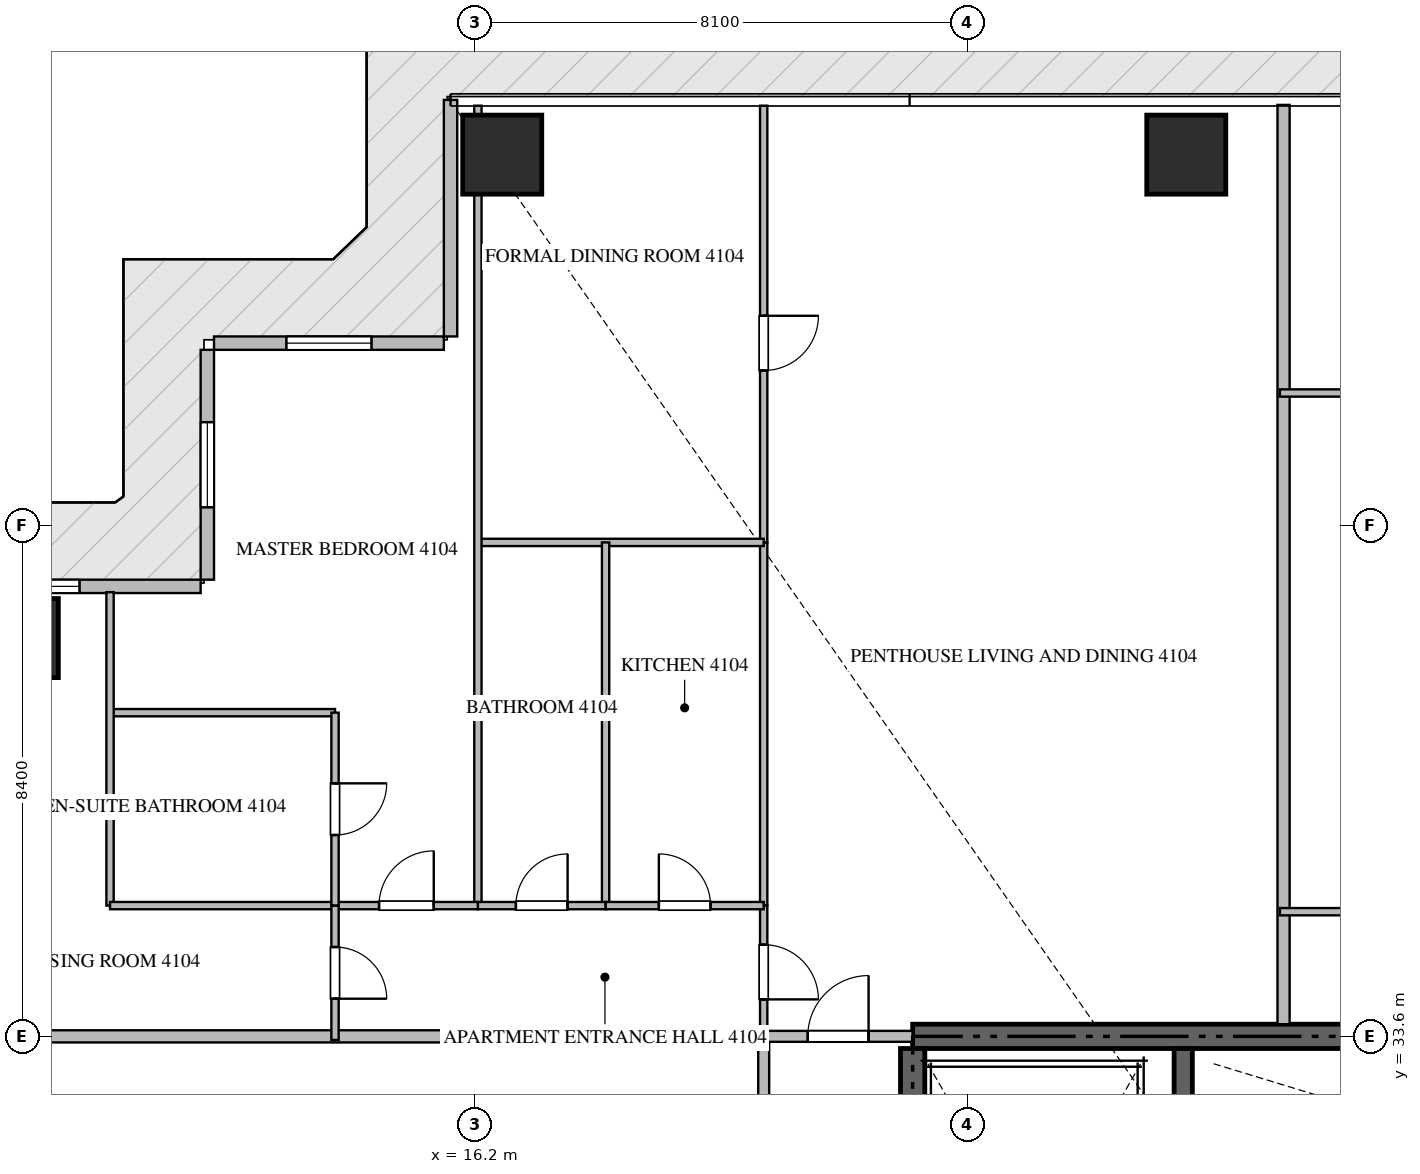
"""IFC4 building model, lengths in metres.
Left out: names, types, materials, properties, quantities, classifications, styles, units other than length and angle.
Written with IfcOpenShell. Run it as: python <this file> out.ifc"""

import sys

from ifc_helpers import new_model, si_unit, direction, frame, frame_2d, origin, origin_2d, place, context, subcontext, project, spatial, rectangle, extrude, source, transform, mapped, element, fill, save


model = new_model("IFC4")
c1 = context("Model", 3, precision=1e-05, world=origin(), true_north=direction((0.0, 1.0)))
c2 = subcontext(c1, "Body", "Model", "MODEL_VIEW")
j1 = project(units=[si_unit("LENGTHUNIT", "METRE"), si_unit("PLANEANGLEUNIT", "RADIAN")], contexts=[c1])
p1 = place(None, origin())
s1 = spatial("IfcSite", under=j1, at=p1, CompositionType="ELEMENT")
p2 = place(p1, origin())
s2 = spatial("IfcBuilding", under=s1, at=p2, CompositionType="ELEMENT")
p3 = place(p2, frame((0.0, 0.0, 165.15)))
s3 = spatial("IfcBuildingStorey", under=s2, at=p3, CompositionType="ELEMENT", Elevation=165.15)
p4 = place(p3, frame((41.4, 33.6, -0.26), z_axis=(0.0, 0.0, 1.0), x_axis=(-1.0, 0.0, 0.0)))
e1 = element("IfcWall", 1, at=p4, inside=s3, PredefinedType="SHEAR", context=c2, shape_type="SweptSolid", body=[
    extrude(rectangle(XDim=18.0, YDim=0.4, at=frame_2d((9.0, 0.0))), origin(), (0.0, 0.0, 1.0), 3.748),
])
p5 = place(p3, frame((23.4, 24.25, -0.26), z_axis=(0.0, 0.0, 1.0), x_axis=(0.0, 1.0, 0.0)))
e2 = element("IfcWall", 2, at=p5, inside=s3, PredefinedType="SHEAR", context=c2, shape_type="SweptSolid", body=[
    extrude(rectangle(XDim=9.15, YDim=0.4, at=frame_2d((4.575, 0.0))), origin(), (0.0, 0.0, 1.0), 3.748),
])
p6 = place(p3, frame((27.85, 23.55, -0.26), z_axis=(0.0, 0.0, 1.0), x_axis=(0.0, 1.0, 0.0)))
e3 = element("IfcWall", 3, at=p6, inside=s3, PredefinedType="SHEAR", context=c2, shape_type="SweptSolid", body=[
    extrude(rectangle(XDim=9.85, YDim=0.3, at=frame_2d((4.925, 0.0))), origin(), (0.0, 0.0, 1.0), 3.748),
])
m1 = source(origin(), c2, "Body", "SweptSolid", [
    extrude(rectangle(XDim=1.3, YDim=1.3, at=origin_2d()), origin(), (0.0, 0.0, 1.0), 3.75),
])
for number, where, z_axis, x_axis in (
    (4, (16.65, 48.1, -0.26), (0.0, 0.0, 1.0), (1.0, 0.0, 0.0)),
    (5, (27.9, 48.1, -0.26), (0.0, 0.0, 1.0), (1.0, 0.0, 0.0)),
    (6, (8.7, 40.15, -0.26), (0.0, 0.0, 1.0), (1.0, 0.0, 0.0)),
):
    element("IfcColumn", number, at=place(p3, frame(where, z_axis=z_axis, x_axis=x_axis)), inside=s3, PredefinedType="COLUMN", context=c2, shape_type="MappedRepresentation", body=[
        mapped(m1, transform((0.0, 0.0, 0.0), scale=1.0)),
    ])
p7 = place(p3, frame((15.8, 49.0, 0.0), z_axis=(0.0, 0.0, 1.0), x_axis=(0.0, -1.0, 0.0)))
e7 = element("IfcWall", 7, at=p7, inside=s3, PredefinedType="ELEMENTEDWALL", context=c2, shape_type="SweptSolid", body=[
    extrude(rectangle(XDim=3.89, YDim=0.22, at=frame_2d((1.945, 0.0))), origin(), (0.0, 0.0, 1.0), 3.475),
])
p8 = place(p3, frame((15.69, 45.0, 0.0), z_axis=(0.0, 0.0, 1.0), x_axis=(-1.0, 0.0, 0.0)))
e8 = element("IfcWall", 8, at=p8, inside=s3, PredefinedType="ELEMENTEDWALL", context=c2, shape_type="SweptSolid", body=[
    extrude(rectangle(XDim=3.78, YDim=0.22, at=frame_2d((1.89, 0.0))), origin(), (0.0, 0.0, 1.0), 3.475),
])
p9 = place(p8, frame((1.19, 0.0, 0.65)))
e9 = element("IfcOpeningElement", 9, at=p9, cuts=e8, PredefinedType="OPENING", context=c2, shape_type="SweptSolid", body=[
    extrude(rectangle(XDim=1.4, YDim=2.05, at=frame_2d((0.7, 1.025))), frame((0.0, 0.12, 0.0), z_axis=(0.0, -1.0, 0.0), x_axis=(1.0, 0.0, 0.0)), (0.0, 0.0, 1.0), 0.24),
])
p10 = place(p3, frame((11.8, 44.89, 0.0), z_axis=(0.0, 0.0, 1.0), x_axis=(0.0, -1.0, 0.0)))
e10 = element("IfcWall", 10, at=p10, inside=s3, PredefinedType="ELEMENTEDWALL", context=c2, shape_type="SweptSolid", body=[
    extrude(rectangle(XDim=3.78, YDim=0.22, at=frame_2d((1.89, 0.0))), origin(), (0.0, 0.0, 1.0), 3.475),
])
p11 = place(p10, frame((1.19, 0.0, 0.65)))
e11 = element("IfcOpeningElement", 11, at=p11, cuts=e10, PredefinedType="OPENING", context=c2, shape_type="SweptSolid", body=[
    extrude(rectangle(XDim=1.4, YDim=2.05, at=frame_2d((0.7, 1.025))), frame((0.0, 0.12, 0.0), z_axis=(0.0, -1.0, 0.0), x_axis=(1.0, 0.0, 0.0)), (0.0, 0.0, 1.0), 0.24),
])
p12 = place(p3, frame((11.69, 41.0, 0.0), z_axis=(0.0, 0.0, 1.0), x_axis=(-1.0, 0.0, 0.0)))
e12 = element("IfcWall", 12, at=p12, inside=s3, PredefinedType="ELEMENTEDWALL", context=c2, shape_type="SweptSolid", body=[
    extrude(rectangle(XDim=3.89, YDim=0.22, at=frame_2d((1.945, 0.0))), origin(), (0.0, 0.0, 1.0), 3.475),
])
p13 = place(p12, frame((1.992, 0.0, 0.65)))
e13 = element("IfcOpeningElement", 13, at=p13, cuts=e12, PredefinedType="OPENING", context=c2, shape_type="SweptSolid", body=[
    extrude(rectangle(XDim=1.4, YDim=2.05, at=frame_2d((0.7, 1.025))), frame((0.0, 0.12, 0.0), z_axis=(0.0, -1.0, 0.0), x_axis=(1.0, 0.0, 0.0)), (0.0, 0.0, 1.0), 0.24),
])
p14 = place(p3, frame((29.5, 33.8, 0.0), z_axis=(0.0, 0.0, 1.0), x_axis=(0.0, 1.0, 0.0)))
e14 = element("IfcWall", 14, at=p14, inside=s3, PredefinedType="PARTITIONING", context=c2, shape_type="SweptSolid", body=[
    extrude(rectangle(XDim=15.118, YDim=0.2, at=frame_2d((7.559, 0.0))), origin(), (0.0, 0.0, 1.0), 3.49),
])
p15 = place(p3, frame((7.882, 33.6, 0.0), z_axis=(0.0, 0.0, 1.0), x_axis=(1.0, 0.0, 0.0)))
e15 = element("IfcWall", 15, at=p15, inside=s3, PredefinedType="PARTITIONING", context=c2, shape_type="SweptSolid", body=[
    extrude(rectangle(XDim=13.068, YDim=0.2, at=frame_2d((6.534, 0.0))), origin(), (0.0, 0.0, 1.0), 3.49),
])
p16 = place(p3, frame((20.95, 14.9, 0.0), z_axis=(0.0, 0.0, 1.0), x_axis=(0.0, 1.0, 0.0)))
e16 = element("IfcWall", 16, at=p16, inside=s3, PredefinedType="PARTITIONING", context=c2, shape_type="SweptSolid", body=[
    extrude(rectangle(XDim=18.7, YDim=0.18, at=frame_2d((9.35, 0.0))), origin(), (0.0, 0.0, 1.0), 3.49),
])
p17 = place(p16, frame((1.805, 0.0, 0.0)))
e17 = element("IfcOpeningElement", 17, at=p17, cuts=e16, PredefinedType="OPENING", context=c2, shape_type="SweptSolid", body=[
    extrude(rectangle(XDim=1.0, YDim=2.15, at=frame_2d((0.5, 1.075))), frame((0.0, 0.1, 0.0), z_axis=(0.0, -1.0, 0.0), x_axis=(1.0, 0.0, 0.0)), (0.0, 0.0, 1.0), 0.2),
])
p18 = place(p16, frame((15.257, 0.0, 0.0)))
e18 = element("IfcOpeningElement", 18, at=p18, cuts=e16, PredefinedType="OPENING", context=c2, shape_type="SweptSolid", body=[
    extrude(rectangle(XDim=1.0, YDim=2.15, at=frame_2d((0.5, 1.075))), frame((0.0, 0.1, 0.0), z_axis=(0.0, -1.0, 0.0), x_axis=(1.0, 0.0, 0.0)), (0.0, 0.0, 1.0), 0.2),
])
p19 = place(p3, frame((20.952, 33.6, 0.0), z_axis=(0.0, 0.0, 1.0), x_axis=(1.0, 0.0, 0.0)))
e19 = element("IfcWall", 19, at=p19, inside=s3, PredefinedType="PARTITIONING", context=c2, shape_type="SweptSolid", body=[
    extrude(rectangle(XDim=2.446, YDim=0.18, at=frame_2d((1.223, 0.0))), origin(), (0.0, 0.0, 1.0), 3.49),
])
p20 = place(p19, frame((0.723, 0.0, 0.0)))
e20 = element("IfcOpeningElement", 20, at=p20, cuts=e19, PredefinedType="OPENING", context=c2, shape_type="SweptSolid", body=[
    extrude(rectangle(XDim=1.0, YDim=2.15, at=frame_2d((0.5, 1.075))), frame((0.0, 0.1, 0.0), z_axis=(0.0, -1.0, 0.0), x_axis=(1.0, 0.0, 0.0)), (0.0, 0.0, 1.0), 0.2),
])
p21 = place(p3, frame((20.95, 35.75, 0.0), z_axis=(0.0, 0.0, 1.0), x_axis=(0.0, -1.0, 0.0)))
e21 = element("IfcWall", 21, at=p21, inside=s3, PredefinedType="PARTITIONING", context=c2, shape_type="SweptSolid", body=[
    extrude(rectangle(XDim=2.148, YDim=0.12, at=frame_2d((1.074, 0.0))), origin(), (0.0, 0.0, 1.0), 3.49),
])
p22 = place(p21, frame((0.642, 0.0, 0.0)))
e22 = element("IfcOpeningElement", 22, at=p22, cuts=e21, PredefinedType="OPENING", context=c2, shape_type="SweptSolid", body=[
    extrude(rectangle(XDim=0.9, YDim=2.1, at=frame_2d((0.45, 1.05))), frame((0.0, 0.07, 0.0), z_axis=(0.0, -1.0, 0.0), x_axis=(1.0, 0.0, 0.0)), (0.0, 0.0, 1.0), 0.14),
])
p23 = place(p3, frame((20.95, 48.905, 0.0), z_axis=(0.0, 0.0, 1.0), x_axis=(0.0, -1.0, 0.0)))
e23 = element("IfcWall", 23, at=p23, inside=s3, PredefinedType="PARTITIONING", context=c2, shape_type="SweptSolid", body=[
    extrude(rectangle(XDim=7.182, YDim=0.12, at=frame_2d((3.591, 0.0))), origin(), (0.0, 0.0, 1.0), 3.49),
])
p24 = place(p23, frame((3.455, 0.0, 0.0)))
e24 = element("IfcOpeningElement", 24, at=p24, cuts=e23, PredefinedType="OPENING", context=c2, shape_type="SweptSolid", body=[
    extrude(rectangle(XDim=0.9, YDim=2.1, at=frame_2d((0.45, 1.05))), frame((0.0, 0.07, 0.0), z_axis=(0.0, -1.0, 0.0), x_axis=(1.0, 0.0, 0.0)), (0.0, 0.0, 1.0), 0.14),
])
p25 = place(p3, frame((20.95, 41.721, 0.0), z_axis=(0.0, 0.0, 1.0), x_axis=(0.0, -1.0, 0.0)))
e25 = element("IfcWall", 25, at=p25, inside=s3, PredefinedType="PARTITIONING", context=c2, shape_type="SweptSolid", body=[
    extrude(rectangle(XDim=5.969, YDim=0.12, at=frame_2d((2.984, 0.0))), origin(), (0.0, 0.0, 1.0), 3.49),
])
p26 = place(p3, frame((16.25, 41.723, 0.0), z_axis=(0.0, 0.0, 1.0), x_axis=(1.0, 0.0, 0.0)))
e26 = element("IfcWall", 26, at=p26, inside=s3, PredefinedType="PARTITIONING", context=c2, shape_type="SweptSolid", body=[
    extrude(rectangle(XDim=4.7, YDim=0.12, at=frame_2d((2.35, 0.0))), origin(), (0.0, 0.0, 1.0), 3.49),
])
p27 = place(p3, frame((16.25, 48.905, 0.0), z_axis=(0.0, 0.0, 1.0), x_axis=(0.0, -1.0, 0.0)))
e27 = element("IfcWall", 27, at=p27, inside=s3, PredefinedType="PARTITIONING", context=c2, shape_type="SweptSolid", body=[
    extrude(rectangle(XDim=13.155, YDim=0.12, at=frame_2d((6.578, 0.0))), origin(), (0.0, 0.0, 1.0), 3.49),
])
p28 = place(p3, frame((18.35, 41.723, 0.0), z_axis=(0.0, 0.0, 1.0), x_axis=(0.0, -1.0, 0.0)))
e28 = element("IfcWall", 28, at=p28, inside=s3, PredefinedType="PARTITIONING", context=c2, shape_type="SweptSolid", body=[
    extrude(rectangle(XDim=5.973, YDim=0.12, at=frame_2d((2.986, 0.0))), origin(), (0.0, 0.0, 1.0), 3.49),
])
p29 = place(p3, frame((16.25, 35.75, 0.0), z_axis=(0.0, 0.0, 1.0), x_axis=(1.0, 0.0, 0.0)))
e29 = element("IfcWall", 29, at=p29, inside=s3, PredefinedType="PARTITIONING", context=c2, shape_type="SweptSolid", body=[
    extrude(rectangle(XDim=2.1, YDim=0.12, at=frame_2d((1.05, 0.0))), origin(), (0.0, 0.0, 1.0), 3.49),
])
p30 = place(p29, frame((0.625, 0.0, 0.0)))
e30 = element("IfcOpeningElement", 30, at=p30, cuts=e29, PredefinedType="OPENING", context=c2, shape_type="SweptSolid", body=[
    extrude(rectangle(XDim=0.85, YDim=2.1, at=frame_2d((0.425, 1.05))), frame((0.0, 0.07, 0.0), z_axis=(0.0, -1.0, 0.0), x_axis=(1.0, 0.0, 0.0)), (0.0, 0.0, 1.0), 0.14),
])
p31 = place(p3, frame((18.352, 35.75, 0.0), z_axis=(0.0, 0.0, 1.0), x_axis=(1.0, 0.0, 0.0)))
e31 = element("IfcWall", 31, at=p31, inside=s3, PredefinedType="PARTITIONING", context=c2, shape_type="SweptSolid", body=[
    extrude(rectangle(XDim=2.598, YDim=0.12, at=frame_2d((1.299, 0.0))), origin(), (0.0, 0.0, 1.0), 3.49),
])
p32 = place(p31, frame((0.874, 0.0, 0.0)))
e32 = element("IfcOpeningElement", 32, at=p32, cuts=e31, PredefinedType="OPENING", context=c2, shape_type="SweptSolid", body=[
    extrude(rectangle(XDim=0.85, YDim=2.1, at=frame_2d((0.425, 1.05))), frame((0.0, 0.07, 0.0), z_axis=(0.0, -1.0, 0.0), x_axis=(1.0, 0.0, 0.0)), (0.0, 0.0, 1.0), 0.14),
])
p33 = place(p3, frame((13.9, 35.75, 0.0), z_axis=(0.0, 0.0, 1.0), x_axis=(1.0, 0.0, 0.0)))
e33 = element("IfcWall", 33, at=p33, inside=s3, PredefinedType="PARTITIONING", context=c2, shape_type="SweptSolid", body=[
    extrude(rectangle(XDim=2.348, YDim=0.12, at=frame_2d((1.174, 0.0))), origin(), (0.0, 0.0, 1.0), 3.49),
])
p34 = place(p33, frame((0.724, 0.0, 0.0)))
e34 = element("IfcOpeningElement", 34, at=p34, cuts=e33, PredefinedType="OPENING", context=c2, shape_type="SweptSolid", body=[
    extrude(rectangle(XDim=0.9, YDim=2.1, at=frame_2d((0.45, 1.05))), frame((0.0, 0.07, 0.0), z_axis=(0.0, -1.0, 0.0), x_axis=(1.0, 0.0, 0.0)), (0.0, 0.0, 1.0), 0.14),
])
p35 = place(p3, frame((10.2, 38.923, 0.0), z_axis=(0.0, 0.0, 1.0), x_axis=(1.0, 0.0, 0.0)))
e35 = element("IfcWall", 35, at=p35, inside=s3, PredefinedType="PARTITIONING", context=c2, shape_type="SweptSolid", body=[
    extrude(rectangle(XDim=3.7, YDim=0.12, at=frame_2d((1.85, 0.0))), origin(), (0.0, 0.0, 1.0), 3.49),
])
p36 = place(p3, frame((10.2, 40.905, 0.0), z_axis=(0.0, 0.0, 1.0), x_axis=(0.0, -1.0, 0.0)))
e36 = element("IfcWall", 36, at=p36, inside=s3, PredefinedType="PARTITIONING", context=c2, shape_type="SweptSolid", body=[
    extrude(rectangle(XDim=5.155, YDim=0.12, at=frame_2d((2.578, 0.0))), origin(), (0.0, 0.0, 1.0), 3.49),
])
p37 = place(p3, frame((10.2, 35.75, 0.0), z_axis=(0.0, 0.0, 1.0), x_axis=(1.0, 0.0, 0.0)))
e37 = element("IfcWall", 37, at=p37, inside=s3, PredefinedType="PARTITIONING", context=c2, shape_type="SweptSolid", body=[
    extrude(rectangle(XDim=3.698, YDim=0.12, at=frame_2d((1.849, 0.0))), origin(), (0.0, 0.0, 1.0), 3.49),
])
p38 = place(p3, frame((13.9, 38.923, 0.0), z_axis=(0.0, 0.0, 1.0), x_axis=(0.0, -1.0, 0.0)))
e38 = element("IfcWall", 38, at=p38, inside=s3, PredefinedType="PARTITIONING", context=c2, shape_type="SweptSolid", body=[
    extrude(rectangle(XDim=3.173, YDim=0.12, at=frame_2d((1.586, 0.0))), origin(), (0.0, 0.0, 1.0), 3.49),
])
p39 = place(p38, frame((1.162, 0.0, 0.0)))
e39 = element("IfcOpeningElement", 39, at=p39, cuts=e38, PredefinedType="OPENING", context=c2, shape_type="SweptSolid", body=[
    extrude(rectangle(XDim=0.85, YDim=2.1, at=frame_2d((0.425, 1.05))), frame((0.0, 0.07, 0.0), z_axis=(0.0, -1.0, 0.0), x_axis=(1.0, 0.0, 0.0)), (0.0, 0.0, 1.0), 0.14),
])
p40 = place(p3, frame((13.9, 35.748, 0.0), z_axis=(0.0, 0.0, 1.0), x_axis=(0.0, -1.0, 0.0)))
e40 = element("IfcWall", 40, at=p40, inside=s3, PredefinedType="PARTITIONING", context=c2, shape_type="SweptSolid", body=[
    extrude(rectangle(XDim=2.208, YDim=0.12, at=frame_2d((1.104, 0.0))), origin(), (0.0, 0.0, 1.0), 3.49),
])
p41 = place(p40, frame((0.679, 0.0, 0.0)))
e41 = element("IfcOpeningElement", 41, at=p41, cuts=e40, PredefinedType="OPENING", context=c2, shape_type="SweptSolid", body=[
    extrude(rectangle(XDim=0.85, YDim=2.1, at=frame_2d((0.425, 1.05))), frame((0.0, 0.07, 0.0), z_axis=(0.0, -1.0, 0.0), x_axis=(1.0, 0.0, 0.0)), (0.0, 0.0, 1.0), 0.14),
])
for number, where, z_axis, x_axis in (
    (42, (29.44, 44.18, 0.0), (0.0, 0.0, 1.0), (1.0, 0.0, 0.0)),
    (43, (29.44, 35.65, 0.0), (0.0, 0.0, 1.0), (1.0, 0.0, 0.0)),
):
    element("IfcWall", number, at=place(p3, frame(where, z_axis=z_axis, x_axis=x_axis)), inside=s3, PredefinedType="PARTITIONING", context=c2, shape_type="SweptSolid", body=[
        extrude(rectangle(XDim=9.06, YDim=0.12, at=frame_2d((4.53, 0.0))), origin(), (0.0, 0.0, 1.0), 3.49),
    ])
m2 = source(origin(), c2, "Body", "SweptSolid", [
    extrude(rectangle(XDim=1.4, YDim=2.05, at=frame_2d((0.7, 1.025))), frame((0.0, 0.03, 0.0), z_axis=(0.0, -1.0, 0.0), x_axis=(1.0, 0.0, 0.0)), (0.0, 0.0, 1.0), 0.06),
])
p42 = place(p9, origin())
e44 = element("IfcWindow", 44, at=p42, inside=s3, PartitioningType="SINGLE_PANEL", PredefinedType="WINDOW", context=c2, shape_type="MappedRepresentation", body=[
    mapped(m2, transform((0.0, 0.0, 0.0), scale=1.0)),
])
fill(e9, e44)
p43 = place(p11, origin())
e45 = element("IfcWindow", 45, at=p43, inside=s3, PartitioningType="SINGLE_PANEL", PredefinedType="WINDOW", context=c2, shape_type="MappedRepresentation", body=[
    mapped(m2, transform((0.0, 0.0, 0.0), scale=1.0)),
])
fill(e11, e45)
p44 = place(p13, origin())
e46 = element("IfcWindow", 46, at=p44, inside=s3, PartitioningType="SINGLE_PANEL", PredefinedType="WINDOW", context=c2, shape_type="MappedRepresentation", body=[
    mapped(m2, transform((0.0, 0.0, 0.0), scale=1.0)),
])
fill(e13, e46)
m3 = source(origin(), c2, "Body", "SweptSolid", [
    extrude(rectangle(XDim=1.0, YDim=2.15, at=frame_2d((0.5, 1.075))), frame((0.0, 0.025, 0.0), z_axis=(0.0, -1.0, 0.0), x_axis=(1.0, 0.0, 0.0)), (0.0, 0.0, 1.0), 0.05),
])
p45 = place(p20, origin())
e47 = element("IfcDoor", 47, at=p45, inside=s3, OperationType="SINGLE_SWING_RIGHT", PredefinedType="DOOR", context=c2, shape_type="MappedRepresentation", body=[
    mapped(m3, transform((0.0, 0.0, 0.0), scale=1.0)),
])
fill(e20, e47)
m4 = source(origin(), c2, "Body", "SweptSolid", [
    extrude(rectangle(XDim=0.9, YDim=2.1, at=frame_2d((0.45, 1.05))), frame((0.0, 0.025, 0.0), z_axis=(0.0, -1.0, 0.0), x_axis=(1.0, 0.0, 0.0)), (0.0, 0.0, 1.0), 0.05),
])
p46 = place(p22, origin())
e48 = element("IfcDoor", 48, at=p46, inside=s3, OperationType="SINGLE_SWING_RIGHT", PredefinedType="DOOR", context=c2, shape_type="MappedRepresentation", body=[
    mapped(m4, transform((0.0, 0.0, 0.0), scale=1.0)),
])
fill(e22, e48)
p47 = place(p24, origin())
e49 = element("IfcDoor", 49, at=p47, inside=s3, OperationType="SINGLE_SWING_LEFT", PredefinedType="DOOR", context=c2, shape_type="MappedRepresentation", body=[
    mapped(m4, transform((0.0, 0.0, 0.0), scale=1.0)),
])
fill(e24, e49)
m5 = source(origin(), c2, "Body", "SweptSolid", [
    extrude(rectangle(XDim=0.85, YDim=2.1, at=frame_2d((0.425, 1.05))), frame((0.0, 0.025, 0.0), z_axis=(0.0, -1.0, 0.0), x_axis=(1.0, 0.0, 0.0)), (0.0, 0.0, 1.0), 0.05),
])
p48 = place(p30, origin())
e50 = element("IfcDoor", 50, at=p48, inside=s3, OperationType="SINGLE_SWING_RIGHT", PredefinedType="DOOR", context=c2, shape_type="MappedRepresentation", body=[
    mapped(m5, transform((0.0, 0.0, 0.0), scale=1.0)),
])
fill(e30, e50)
p49 = place(p32, origin())
e51 = element("IfcDoor", 51, at=p49, inside=s3, OperationType="SINGLE_SWING_LEFT", PredefinedType="DOOR", context=c2, shape_type="MappedRepresentation", body=[
    mapped(m5, transform((0.0, 0.0, 0.0), scale=1.0)),
])
fill(e32, e51)
p50 = place(p34, origin())
e52 = element("IfcDoor", 52, at=p50, inside=s3, OperationType="SINGLE_SWING_RIGHT", PredefinedType="DOOR", context=c2, shape_type="MappedRepresentation", body=[
    mapped(m4, transform((0.0, 0.0, 0.0), scale=1.0)),
])
fill(e34, e52)
p51 = place(p39, origin())
e53 = element("IfcDoor", 53, at=p51, inside=s3, OperationType="SINGLE_SWING_LEFT", PredefinedType="DOOR", context=c2, shape_type="MappedRepresentation", body=[
    mapped(m5, transform((0.0, 0.0, 0.0), scale=1.0)),
])
fill(e39, e53)
p52 = place(p41, origin())
e54 = element("IfcDoor", 54, at=p52, inside=s3, OperationType="SINGLE_SWING_RIGHT", PredefinedType="DOOR", context=c2, shape_type="MappedRepresentation", body=[
    mapped(m5, transform((0.0, 0.0, 0.0), scale=1.0)),
])
fill(e41, e54)
save(model, sys.argv[1])
